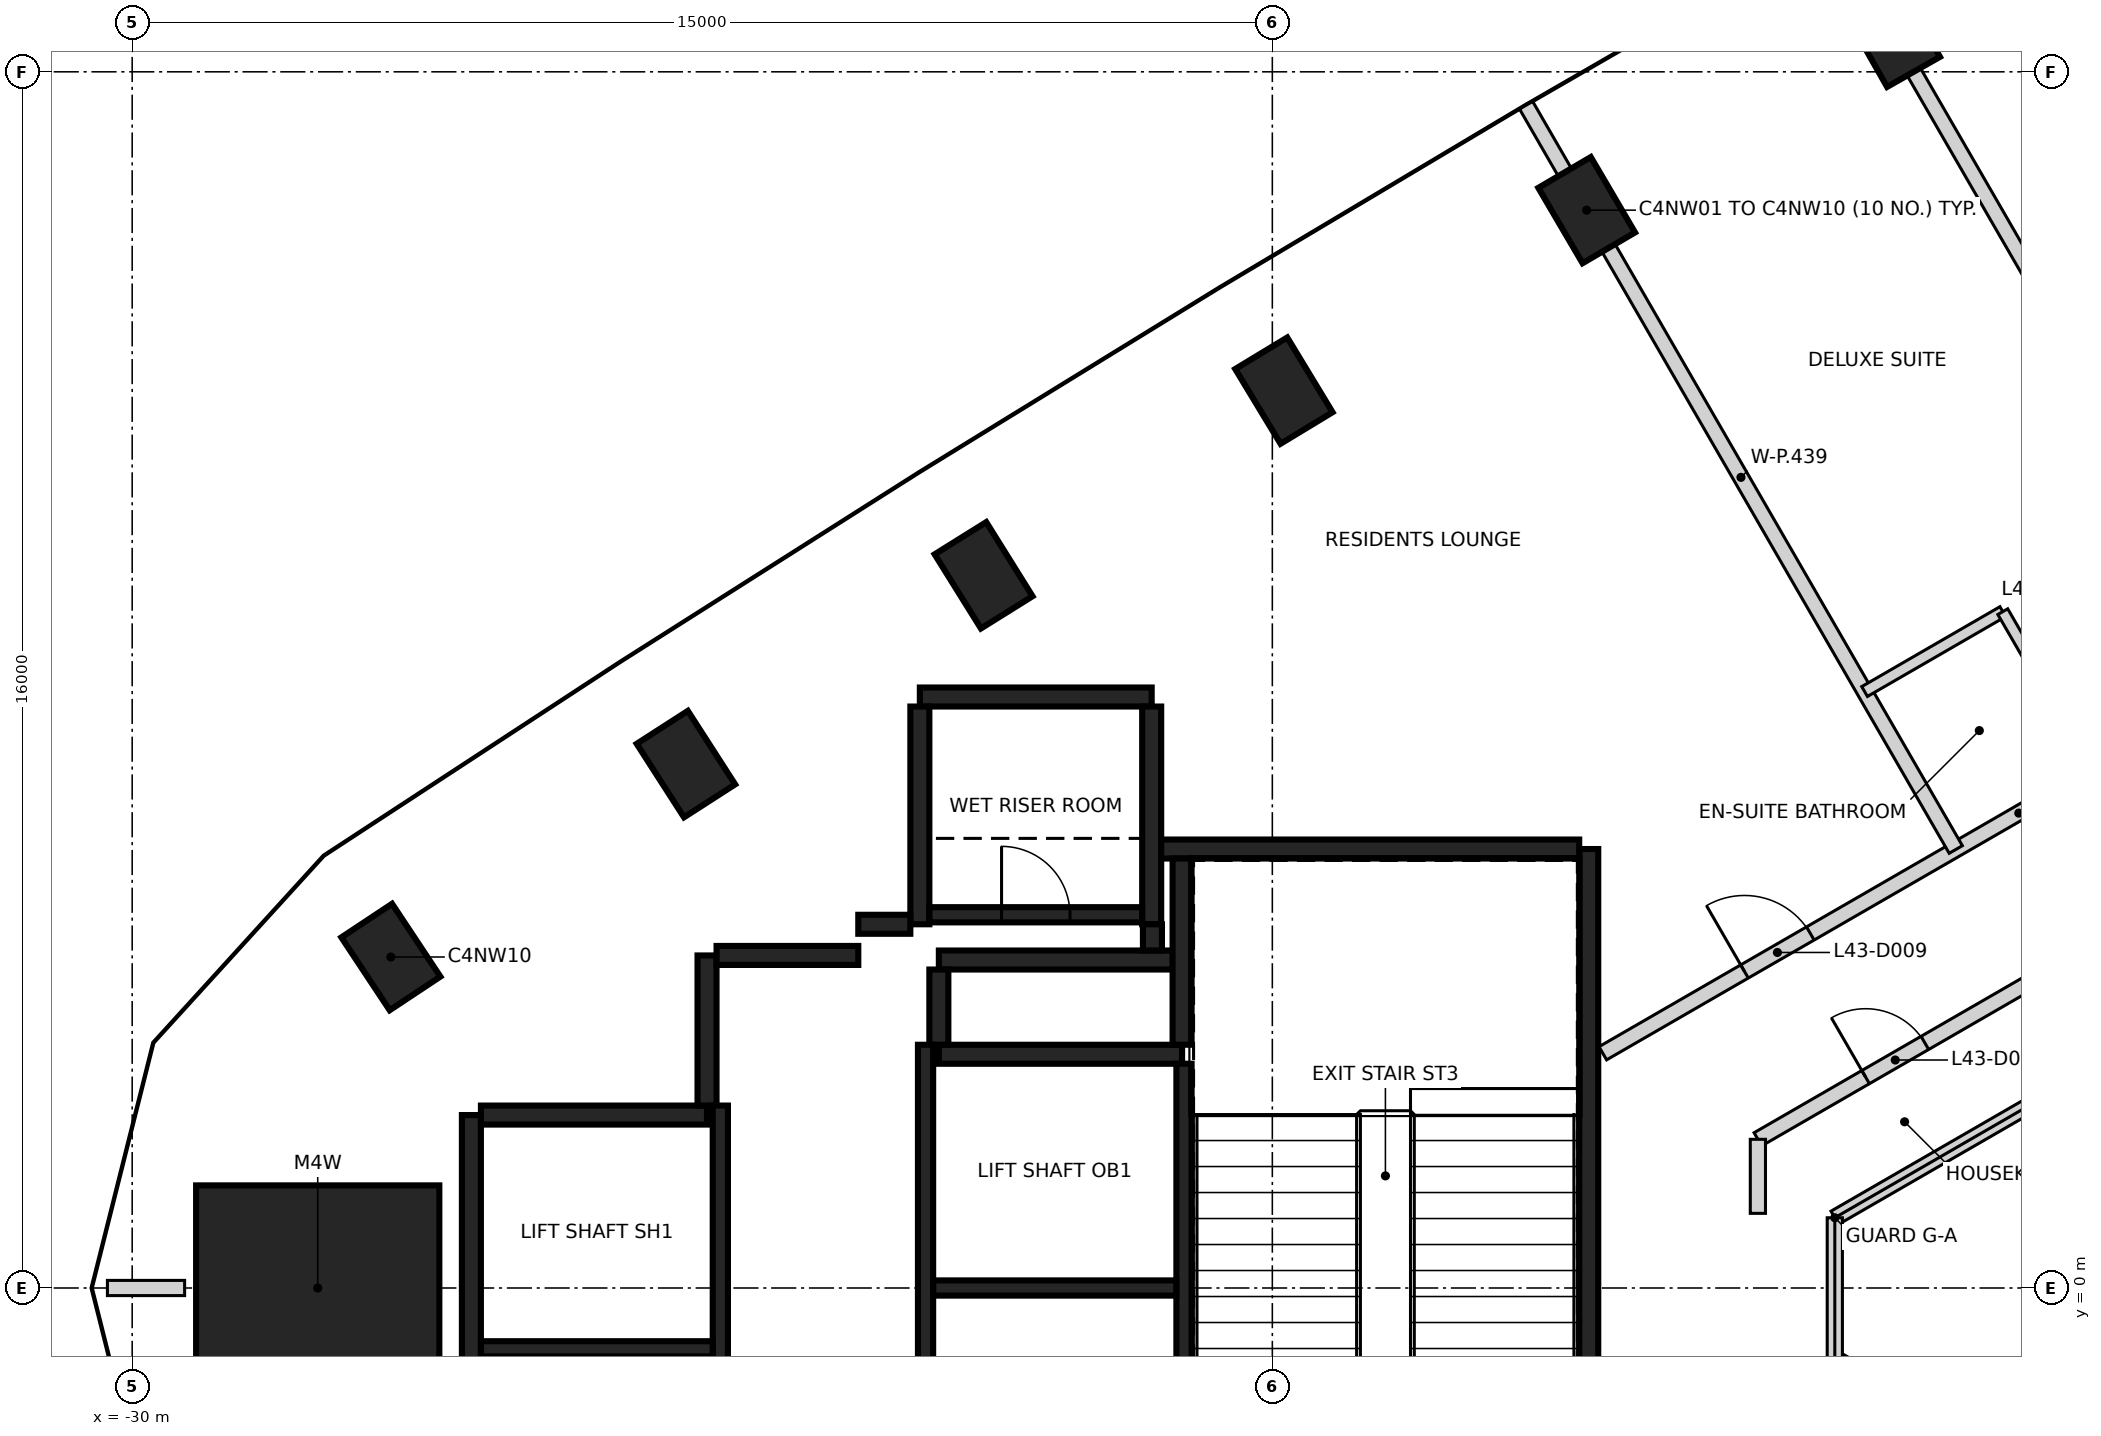
"""IFC4 building model, lengths in metres.
Left out: names, types, materials, properties, quantities, classifications, styles, units other than length and angle.
Written with IfcOpenShell. Run it as: python <this file> out.ifc"""

import sys

from ifc_helpers import new_model, si_unit, direction, frame, frame_2d, origin, origin_2d, place, context, subcontext, project, spatial, rectangle, extrude, element, fill, save


model = new_model("IFC4")
c1 = context("Model", 3, precision=1e-05, world=origin(), true_north=direction((0.0, 1.0)))
c2 = subcontext(c1, "Body", "Model", "MODEL_VIEW")
j1 = project(units=[si_unit("LENGTHUNIT", "METRE"), si_unit("PLANEANGLEUNIT", "RADIAN")], contexts=[c1])
p1 = place(None, origin())
s1 = spatial("IfcSite", under=j1, at=p1, CompositionType="ELEMENT")
p2 = place(p1, origin())
s2 = spatial("IfcBuilding", under=s1, at=p2, CompositionType="ELEMENT")
p3 = place(p2, frame((0.0, 0.0, 175.6)))
s3 = spatial("IfcBuildingStorey", under=s2, at=p3, CompositionType="ELEMENT", Elevation=175.6)
for number, where, z_axis, x_axis in (
    (1, (-6.848, 16.499, -0.35), (0.0, 0.0, 1.0), (-0.494, 0.87, 0.0)),
    (2, (-10.864, 14.18, -0.35), (0.0, 0.0, 1.0), (-0.506, 0.862, 0.0)),
    (3, (-14.848, 11.806, -0.35), (0.0, 0.0, 1.0), (-0.518, 0.855, 0.0)),
    (4, (-18.799, 9.376, -0.35), (0.0, 0.0, 1.0), (-0.529, 0.848, 0.0)),
    (5, (-22.715, 6.892, -0.35), (0.0, 0.0, 1.0), (-0.541, 0.841, 0.0)),
    (6, (-26.597, 4.354, -0.35), (0.0, 0.0, 1.0), (-0.553, 0.833, 0.0)),
):
    element("IfcColumn", number, at=place(p3, frame(where, z_axis=z_axis, x_axis=x_axis)), inside=s3, PredefinedType="COLUMN", context=c2, shape_type="SweptSolid", body=[
        extrude(rectangle(XDim=1.15, YDim=0.8, at=origin_2d()), origin(), (0.0, 0.0, 1.0), 3.6),
    ])
p4 = place(p3, frame((-27.559, 0.0, -0.35), z_axis=(0.0, 0.0, 1.0), x_axis=(1.0, 0.0, 0.0)))
e7 = element("IfcColumn", 7, at=p4, inside=s3, PredefinedType="COLUMN", context=c2, shape_type="SweptSolid", body=[
    extrude(rectangle(XDim=3.2, YDim=2.7, at=origin_2d()), origin(), (0.0, 0.0, 1.0), 3.6),
])
p5 = place(p3, frame((-10.837, 5.775, 0.0), z_axis=(0.0, 0.0, 1.0), x_axis=(0.0, -1.0, 0.0)))
e8 = element("IfcWall", 8, at=p5, inside=s3, PredefinedType="SHEAR", context=c2, shape_type="SweptSolid", body=[
    extrude(rectangle(XDim=11.55, YDim=0.25, at=frame_2d((5.775, 0.0))), origin(), (0.0, 0.0, 1.0), 3.25),
])
p6 = place(p5, frame((10.025, 0.0, 0.0)))
e9 = element("IfcOpeningElement", 9, at=p6, cuts=e8, PredefinedType="OPENING", context=c2, shape_type="SweptSolid", body=[
    extrude(rectangle(XDim=1.2, YDim=2.1, at=frame_2d((0.6, 1.05))), frame((0.0, 0.135, 0.0), z_axis=(0.0, -1.0, 0.0), x_axis=(1.0, 0.0, 0.0)), (0.0, 0.0, 1.0), 0.27),
])
p7 = place(p5, frame((8.725, 0.0, 0.0)))
e10 = element("IfcOpeningElement", 10, at=p7, cuts=e8, PredefinedType="OPENING", context=c2, shape_type="SweptSolid", body=[
    extrude(rectangle(XDim=1.2, YDim=2.1, at=frame_2d((0.6, 1.05))), frame((0.0, 0.135, 0.0), z_axis=(0.0, -1.0, 0.0), x_axis=(1.0, 0.0, 0.0)), (0.0, 0.0, 1.0), 0.27),
])
p8 = place(p3, frame((-25.537, -3.575, 0.0), z_axis=(0.0, 0.0, 1.0), x_axis=(0.0, 1.0, 0.0)))
e11 = element("IfcWall", 11, at=p8, inside=s3, PredefinedType="SHEAR", context=c2, shape_type="SweptSolid", body=[
    extrude(rectangle(XDim=5.85, YDim=0.25, at=frame_2d((2.925, 0.0))), origin(), (0.0, 0.0, 1.0), 3.25),
])
p9 = place(p3, frame((-16.472, 5.775, 0.0), z_axis=(0.0, 0.0, 1.0), x_axis=(1.0, 0.0, 0.0)))
e12 = element("IfcWall", 12, at=p9, inside=s3, PredefinedType="SHEAR", context=c2, shape_type="SweptSolid", body=[
    extrude(rectangle(XDim=5.51, YDim=0.25, at=frame_2d((2.755, 0.0))), origin(), (0.0, 0.0, 1.0), 3.25),
])
p10 = place(p3, frame((-19.387, 3.075, 0.0), z_axis=(0.0, 0.0, 1.0), x_axis=(1.0, 0.0, 0.0)))
e13 = element("IfcWall", 13, at=p10, inside=s3, PredefinedType="SHEAR", context=c2, shape_type="SweptSolid", body=[
    extrude(rectangle(XDim=3.2, YDim=0.25, at=frame_2d((1.6, 0.0))), origin(), (0.0, 0.0, 1.0), 3.25),
])
p11 = place(p3, frame((-25.412, 2.275, 0.0), z_axis=(0.0, 0.0, 1.0), x_axis=(1.0, 0.0, 0.0)))
e14 = element("IfcWall", 14, at=p11, inside=s3, PredefinedType="SHEAR", context=c2, shape_type="SweptSolid", body=[
    extrude(rectangle(XDim=2.975, YDim=0.25, at=frame_2d((1.487, 0.0))), origin(), (0.0, 0.0, 1.0), 3.25),
])
p12 = place(p3, frame((-19.637, 7.775, 0.0), z_axis=(0.0, 0.0, 1.0), x_axis=(1.0, 0.0, 0.0)))
e15 = element("IfcWall", 15, at=p12, inside=s3, PredefinedType="SHEAR", context=c2, shape_type="SweptSolid", body=[
    extrude(rectangle(XDim=3.05, YDim=0.25, at=frame_2d((1.525, 0.0))), origin(), (0.0, 0.0, 1.0), 3.25),
])
for number, where, z_axis, x_axis in (
    (16, (-16.587, 7.65, 0.0), (0.0, 0.0, 1.0), (0.0, -1.0, 0.0)),
    (17, (-19.637, 4.785, 0.0), (0.0, 0.0, 1.0), (0.0, 1.0, 0.0)),
):
    element("IfcWall", number, at=place(p3, frame(where, z_axis=z_axis, x_axis=x_axis)), inside=s3, PredefinedType="SHEAR", context=c2, shape_type="SweptSolid", body=[
        extrude(rectangle(XDim=2.865, YDim=0.25, at=frame_2d((1.432, 0.0))), origin(), (0.0, 0.0, 1.0), 3.25),
    ])
p13 = place(p3, frame((-16.302, 4.315, 0.0), z_axis=(0.0, 0.0, 1.0), x_axis=(-1.0, 0.0, 0.0)))
e18 = element("IfcWall", 18, at=p13, inside=s3, PredefinedType="SHEAR", context=c2, shape_type="SweptSolid", body=[
    extrude(rectangle(XDim=3.085, YDim=0.25, at=frame_2d((1.542, 0.0))), origin(), (0.0, 0.0, 1.0), 3.25),
])
p14 = place(p3, frame((-16.187, 3.2, 0.0), z_axis=(0.0, 0.0, 1.0), x_axis=(0.0, 1.0, 0.0)))
e19 = element("IfcWall", 19, at=p14, inside=s3, PredefinedType="SHEAR", context=c2, shape_type="SweptSolid", body=[
    extrude(rectangle(XDim=2.449, YDim=0.25, at=frame_2d((1.225, 0.0))), origin(), (0.0, 0.0, 1.0), 3.25),
])
p15 = place(p3, frame((-22.437, 2.4, 0.0), z_axis=(0.0, 0.0, 1.0), x_axis=(0.0, 1.0, 0.0)))
e20 = element("IfcWall", 20, at=p15, inside=s3, PredefinedType="SHEAR", context=c2, shape_type="SweptSolid", body=[
    extrude(rectangle(XDim=1.975, YDim=0.25, at=frame_2d((0.987, 0.0))), origin(), (0.0, 0.0, 1.0), 3.25),
])
p16 = place(p3, frame((-22.312, 4.375, 0.0), z_axis=(0.0, 0.0, 1.0), x_axis=(1.0, 0.0, 0.0)))
e21 = element("IfcWall", 21, at=p16, inside=s3, PredefinedType="SHEAR", context=c2, shape_type="SweptSolid", body=[
    extrude(rectangle(XDim=1.865, YDim=0.25, at=frame_2d((0.932, 0.0))), origin(), (0.0, 0.0, 1.0), 3.25),
])
p17 = place(p3, frame((-19.387, 4.19, 0.0), z_axis=(0.0, 0.0, 1.0), x_axis=(0.0, -1.0, 0.0)))
e22 = element("IfcWall", 22, at=p17, inside=s3, PredefinedType="SHEAR", context=c2, shape_type="SweptSolid", body=[
    extrude(rectangle(XDim=0.989, YDim=0.25, at=frame_2d((0.495, 0.0))), origin(), (0.0, 0.0, 1.0), 3.25),
])
p18 = place(p3, frame((-20.447, 4.785, 0.0), z_axis=(0.0, 0.0, 1.0), x_axis=(1.0, 0.0, 0.0)))
e23 = element("IfcWall", 23, at=p18, inside=s3, PredefinedType="SHEAR", context=c2, shape_type="SweptSolid", body=[
    extrude(rectangle(XDim=0.685, YDim=0.25, at=frame_2d((0.342, 0.0))), origin(), (0.0, 0.0, 1.0), 3.25),
])
p19 = place(p3, frame((-16.577, 4.785, 0.0), z_axis=(0.0, 0.0, 1.0), x_axis=(0.0, -1.0, 0.0)))
e24 = element("IfcWall", 24, at=p19, inside=s3, PredefinedType="SHEAR", context=c2, shape_type="SweptSolid", body=[
    extrude(rectangle(XDim=0.344, YDim=0.25, at=frame_2d((0.172, 0.0))), origin(), (0.0, 0.0, 1.0), 3.25),
])
p20 = place(p3, frame((-16.162, 2.951, 0.0), z_axis=(0.0, 0.0, 1.0), x_axis=(0.0, -1.0, 0.0)))
e25 = element("IfcWall", 25, at=p20, inside=s3, PredefinedType="SHEAR", context=c2, shape_type="SweptSolid", body=[
    extrude(rectangle(XDim=5.851, YDim=0.2, at=frame_2d((2.925, 0.0))), origin(), (0.0, 0.0, 1.0), 3.25),
])
for number, where, z_axis, x_axis in (
    (26, (-19.562, -2.9, 0.0), (0.0, 0.0, 1.0), (0.0, 1.0, 0.0)),
    (27, (-22.262, 2.4, 0.0), (0.0, 0.0, 1.0), (0.0, -1.0, 0.0)),
):
    element("IfcWall", number, at=place(p3, frame(where, z_axis=z_axis, x_axis=x_axis)), inside=s3, PredefinedType="SHEAR", context=c2, shape_type="SweptSolid", body=[
        extrude(rectangle(XDim=6.1, YDim=0.2, at=frame_2d((3.05, 0.0))), origin(), (0.0, 0.0, 1.0), 3.25),
    ])
p21 = place(p3, frame((-16.263, 0.0, 0.0), z_axis=(0.0, 0.0, 1.0), x_axis=(-1.0, 0.0, 0.0)))
e28 = element("IfcWall", 28, at=p21, inside=s3, PredefinedType="SHEAR", context=c2, shape_type="SweptSolid", body=[
    extrude(rectangle(XDim=3.198, YDim=0.2, at=frame_2d((1.599, 0.0))), origin(), (0.0, 0.0, 1.0), 3.25),
])
p22 = place(p3, frame((-22.363, -0.8, 0.0), z_axis=(0.0, 0.0, 1.0), x_axis=(-1.0, 0.0, 0.0)))
e29 = element("IfcWall", 29, at=p22, inside=s3, PredefinedType="SHEAR", context=c2, shape_type="SweptSolid", body=[
    extrude(rectangle(XDim=3.048, YDim=0.2, at=frame_2d((1.524, 0.0))), origin(), (0.0, 0.0, 1.0), 3.25),
])
p23 = place(p3, frame((-19.511, 4.91, 0.0), z_axis=(0.0, 0.0, 1.0), x_axis=(1.0, 0.0, 0.0)))
e30 = element("IfcWall", 30, at=p23, inside=s3, PredefinedType="SHEAR", context=c2, shape_type="SweptSolid", body=[
    extrude(rectangle(XDim=2.798, YDim=0.2, at=frame_2d((1.399, 0.0))), origin(), (0.0, 0.0, 1.0), 3.25),
])
p24 = place(p23, frame((0.949, 0.0, 0.0)))
e31 = element("IfcOpeningElement", 31, at=p24, cuts=e30, PredefinedType="OPENING", context=c2, shape_type="SweptSolid", body=[
    extrude(rectangle(XDim=0.9, YDim=2.1, at=frame_2d((0.45, 1.05))), frame((0.0, 0.11, 0.0), z_axis=(0.0, -1.0, 0.0), x_axis=(1.0, 0.0, 0.0)), (0.0, 0.0, 1.0), 0.22),
])
p25 = place(p3, frame((-10.652, 3.088, 0.0), z_axis=(0.0, 0.0, 1.0), x_axis=(0.866031821623, 0.499988883812, 0.0)))
e32 = element("IfcWall", 32, at=p25, inside=s3, PredefinedType="PARTITIONING", context=c2, shape_type="SweptSolid", body=[
    extrude(rectangle(XDim=12.638, YDim=0.2, at=frame_2d((6.319, 0.0))), origin(), (0.0, 0.0, 1.0), 3.25),
])
p26 = place(p25, frame((10.813, 0.0, 0.0)))
e33 = element("IfcOpeningElement", 33, at=p26, cuts=e32, PredefinedType="OPENING", context=c2, shape_type="SweptSolid", body=[
    extrude(rectangle(XDim=1.0, YDim=2.1, at=frame_2d((0.5, 1.05))), frame((0.0, 0.11, 0.0), z_axis=(0.0, -1.0, 0.0), x_axis=(1.0, 0.0, 0.0)), (0.0, 0.0, 1.0), 0.22),
])
p27 = place(p25, frame((8.862, 0.0, 0.0)))
e34 = element("IfcOpeningElement", 34, at=p27, cuts=e32, PredefinedType="OPENING", context=c2, shape_type="SweptSolid", body=[
    extrude(rectangle(XDim=0.95, YDim=2.1, at=frame_2d((0.475, 1.05))), frame((0.0, 0.11, 0.0), z_axis=(0.0, -1.0, 0.0), x_axis=(1.0, 0.0, 0.0)), (0.0, 0.0, 1.0), 0.22),
])
p28 = place(p25, frame((2.153, 0.0, 0.0)))
e35 = element("IfcOpeningElement", 35, at=p28, cuts=e32, PredefinedType="OPENING", context=c2, shape_type="SweptSolid", body=[
    extrude(rectangle(XDim=1.0, YDim=2.1, at=frame_2d((0.5, 1.05))), frame((0.0, 0.11, 0.0), z_axis=(0.0, -1.0, 0.0), x_axis=(1.0, 0.0, 0.0)), (0.0, 0.0, 1.0), 0.22),
])
p29 = place(p3, frame((-8.612, 1.956, 0.0), z_axis=(0.0, 0.0, 1.0), x_axis=(0.866034386606, 0.499984440973, 0.0)))
e36 = element("IfcWall", 36, at=p29, inside=s3, PredefinedType="PARTITIONING", context=c2, shape_type="SweptSolid", body=[
    extrude(rectangle(XDim=12.96, YDim=0.2, at=frame_2d((6.48, 0.0))), origin(), (0.0, 0.0, 1.0), 3.25),
])
p30 = place(p29, frame((8.105, 0.0, 0.0)))
e37 = element("IfcOpeningElement", 37, at=p30, cuts=e36, PredefinedType="OPENING", context=c2, shape_type="SweptSolid", body=[
    extrude(rectangle(XDim=0.9, YDim=2.1, at=frame_2d((0.45, 1.05))), frame((0.0, 0.11, 0.0), z_axis=(0.0, -1.0, 0.0), x_axis=(1.0, 0.0, 0.0)), (0.0, 0.0, 1.0), 0.22),
])
p31 = place(p29, frame((1.637, 0.0, 0.0)))
e38 = element("IfcOpeningElement", 38, at=p31, cuts=e36, PredefinedType="OPENING", context=c2, shape_type="SweptSolid", body=[
    extrude(rectangle(XDim=0.9, YDim=2.1, at=frame_2d((0.45, 1.05))), frame((0.0, 0.11, 0.0), z_axis=(0.0, -1.0, 0.0), x_axis=(1.0, 0.0, 0.0)), (0.0, 0.0, 1.0), 0.22),
])
p32 = place(p3, frame((-8.612, 0.982, 0.0), z_axis=(0.0, 0.0, 1.0), x_axis=(0.0, 1.0, 0.0)))
e39 = element("IfcWall", 39, at=p32, inside=s3, PredefinedType="PARTITIONING", context=c2, shape_type="SweptSolid", body=[
    extrude(rectangle(XDim=0.974, YDim=0.2, at=frame_2d((0.487, 0.0))), origin(), (0.0, 0.0, 1.0), 3.25),
])
p33 = place(p3, frame((-30.326, 0.0, 0.0), z_axis=(0.0, 0.0, 1.0), x_axis=(1.0, 0.0, 0.0)))
e40 = element("IfcWall", 40, at=p33, inside=s3, PredefinedType="PARTITIONING", context=c2, shape_type="SweptSolid", body=[
    extrude(rectangle(XDim=1.016, YDim=0.2, at=frame_2d((0.508, 0.0))), origin(), (0.0, 0.0, 1.0), 3.25),
])
p34 = place(p3, frame((-11.661, 15.561, 0.0), z_axis=(0.0, 0.0, 1.0), x_axis=(0.499987250653, -0.866032764498, 0.0)))
e41 = element("IfcWall", 41, at=p34, inside=s3, PredefinedType="PARTITIONING", context=c2, shape_type="SweptSolid", body=[
    extrude(rectangle(XDim=11.306, YDim=0.2, at=frame_2d((5.653, 0.0))), origin(), (0.0, 0.0, 1.0), 3.25),
])
for number, where, z_axis, x_axis in (
    (42, (-7.6, 0.924, 0.0), (0.0, 0.0, 1.0), (0.866, 0.5, 0.0)),
    (43, (-7.6, -0.924, 0.0), (0.0, 0.0, 1.0), (0.866, -0.5, 0.0)),
):
    element("IfcWall", number, at=place(p3, frame(where, z_axis=z_axis, x_axis=x_axis)), inside=s3, PredefinedType="PARTITIONING", context=c2, shape_type="SweptSolid", body=[
        extrude(rectangle(XDim=12.24, YDim=0.2, at=frame_2d((6.12, 0.0))), origin(), (0.0, 0.0, 1.0), 3.25),
    ])
p35 = place(p3, frame((-7.6, -0.924, 0.0), z_axis=(0.0, 0.0, 1.0), x_axis=(0.0, 1.0, 0.0)))
e44 = element("IfcWall", 44, at=p35, inside=s3, PredefinedType="PARTITIONING", context=c2, shape_type="SweptSolid", body=[
    extrude(rectangle(XDim=1.848, YDim=0.2, at=frame_2d((0.924, 0.0))), origin(), (0.0, 0.0, 1.0), 3.25),
])
p36 = place(p3, frame((-7.646, 17.879, 0.0), z_axis=(0.0, 0.0, 1.0), x_axis=(0.500047691386, -0.865997867399, 0.0)))
e45 = element("IfcWall", 45, at=p36, inside=s3, PredefinedType="PARTITIONING", context=c2, shape_type="SweptSolid", body=[
    extrude(rectangle(XDim=11.306, YDim=0.2, at=frame_2d((5.653, 0.0))), origin(), (0.0, 0.0, 1.0), 3.25),
])
p37 = place(p3, frame((-7.208, 7.847, 0.0), z_axis=(0.0, 0.0, 1.0), x_axis=(0.865749785376, 0.500477081515, 0.0)))
e46 = element("IfcWall", 46, at=p37, inside=s3, PredefinedType="PARTITIONING", context=c2, shape_type="SweptSolid", body=[
    extrude(rectangle(XDim=2.1, YDim=0.15, at=frame_2d((1.05, 0.0))), origin(), (0.0, 0.0, 1.0), 3.25),
])
p38 = place(p3, frame((-5.39, 8.898, 0.0), z_axis=(0.0, 0.0, 1.0), x_axis=(0.500218298882, -0.865899332177, 0.0)))
e47 = element("IfcWall", 47, at=p38, inside=s3, PredefinedType="PARTITIONING", context=c2, shape_type="SweptSolid", body=[
    extrude(rectangle(XDim=2.401, YDim=0.15, at=frame_2d((1.2, 0.0))), origin(), (0.0, 0.0, 1.0), 3.25),
])
p39 = place(p38, frame((0.801, 0.0, 0.0)))
e48 = element("IfcOpeningElement", 48, at=p39, cuts=e47, PredefinedType="OPENING", context=c2, shape_type="SweptSolid", body=[
    extrude(rectangle(XDim=0.8, YDim=2.1, at=frame_2d((0.4, 1.05))), frame((0.0, 0.085, 0.0), z_axis=(0.0, -1.0, 0.0), x_axis=(1.0, 0.0, 0.0)), (0.0, 0.0, 1.0), 0.17),
])
p40 = place(p24, origin())
e49 = element("IfcDoor", 49, at=p40, inside=s3, OperationType="SINGLE_SWING_LEFT", PredefinedType="DOOR", context=c2, shape_type="SweptSolid", body=[
    extrude(rectangle(XDim=0.9, YDim=2.1, at=frame_2d((0.45, 1.05))), frame((0.0, 0.025, 0.0), z_axis=(0.0, -1.0, 0.0), x_axis=(1.0, 0.0, 0.0)), (0.0, 0.0, 1.0), 0.05),
])
fill(e31, e49)
p41 = place(p28, origin())
e50 = element("IfcDoor", 50, at=p41, inside=s3, OperationType="SINGLE_SWING_LEFT", PredefinedType="DOOR", context=c2, shape_type="SweptSolid", body=[
    extrude(rectangle(XDim=1.0, YDim=2.1, at=frame_2d((0.5, 1.05))), frame((0.0, 0.025, 0.0), z_axis=(0.0, -1.0, 0.0), x_axis=(1.0, 0.0, 0.0)), (0.0, 0.0, 1.0), 0.05),
])
fill(e35, e50)
p42 = place(p31, frame((0.9, 0.0, 0.0), z_axis=(0.0, 0.0, 1.0), x_axis=(-1.0, 0.0, 0.0)))
e51 = element("IfcDoor", 51, at=p42, inside=s3, OperationType="SINGLE_SWING_LEFT", PredefinedType="DOOR", context=c2, shape_type="SweptSolid", body=[
    extrude(rectangle(XDim=0.9, YDim=2.1, at=frame_2d((0.45, 1.05))), frame((0.0, 0.025, 0.0), z_axis=(0.0, -1.0, 0.0), x_axis=(1.0, 0.0, 0.0)), (0.0, 0.0, 1.0), 0.05),
])
fill(e38, e51)
save(model, sys.argv[1])
